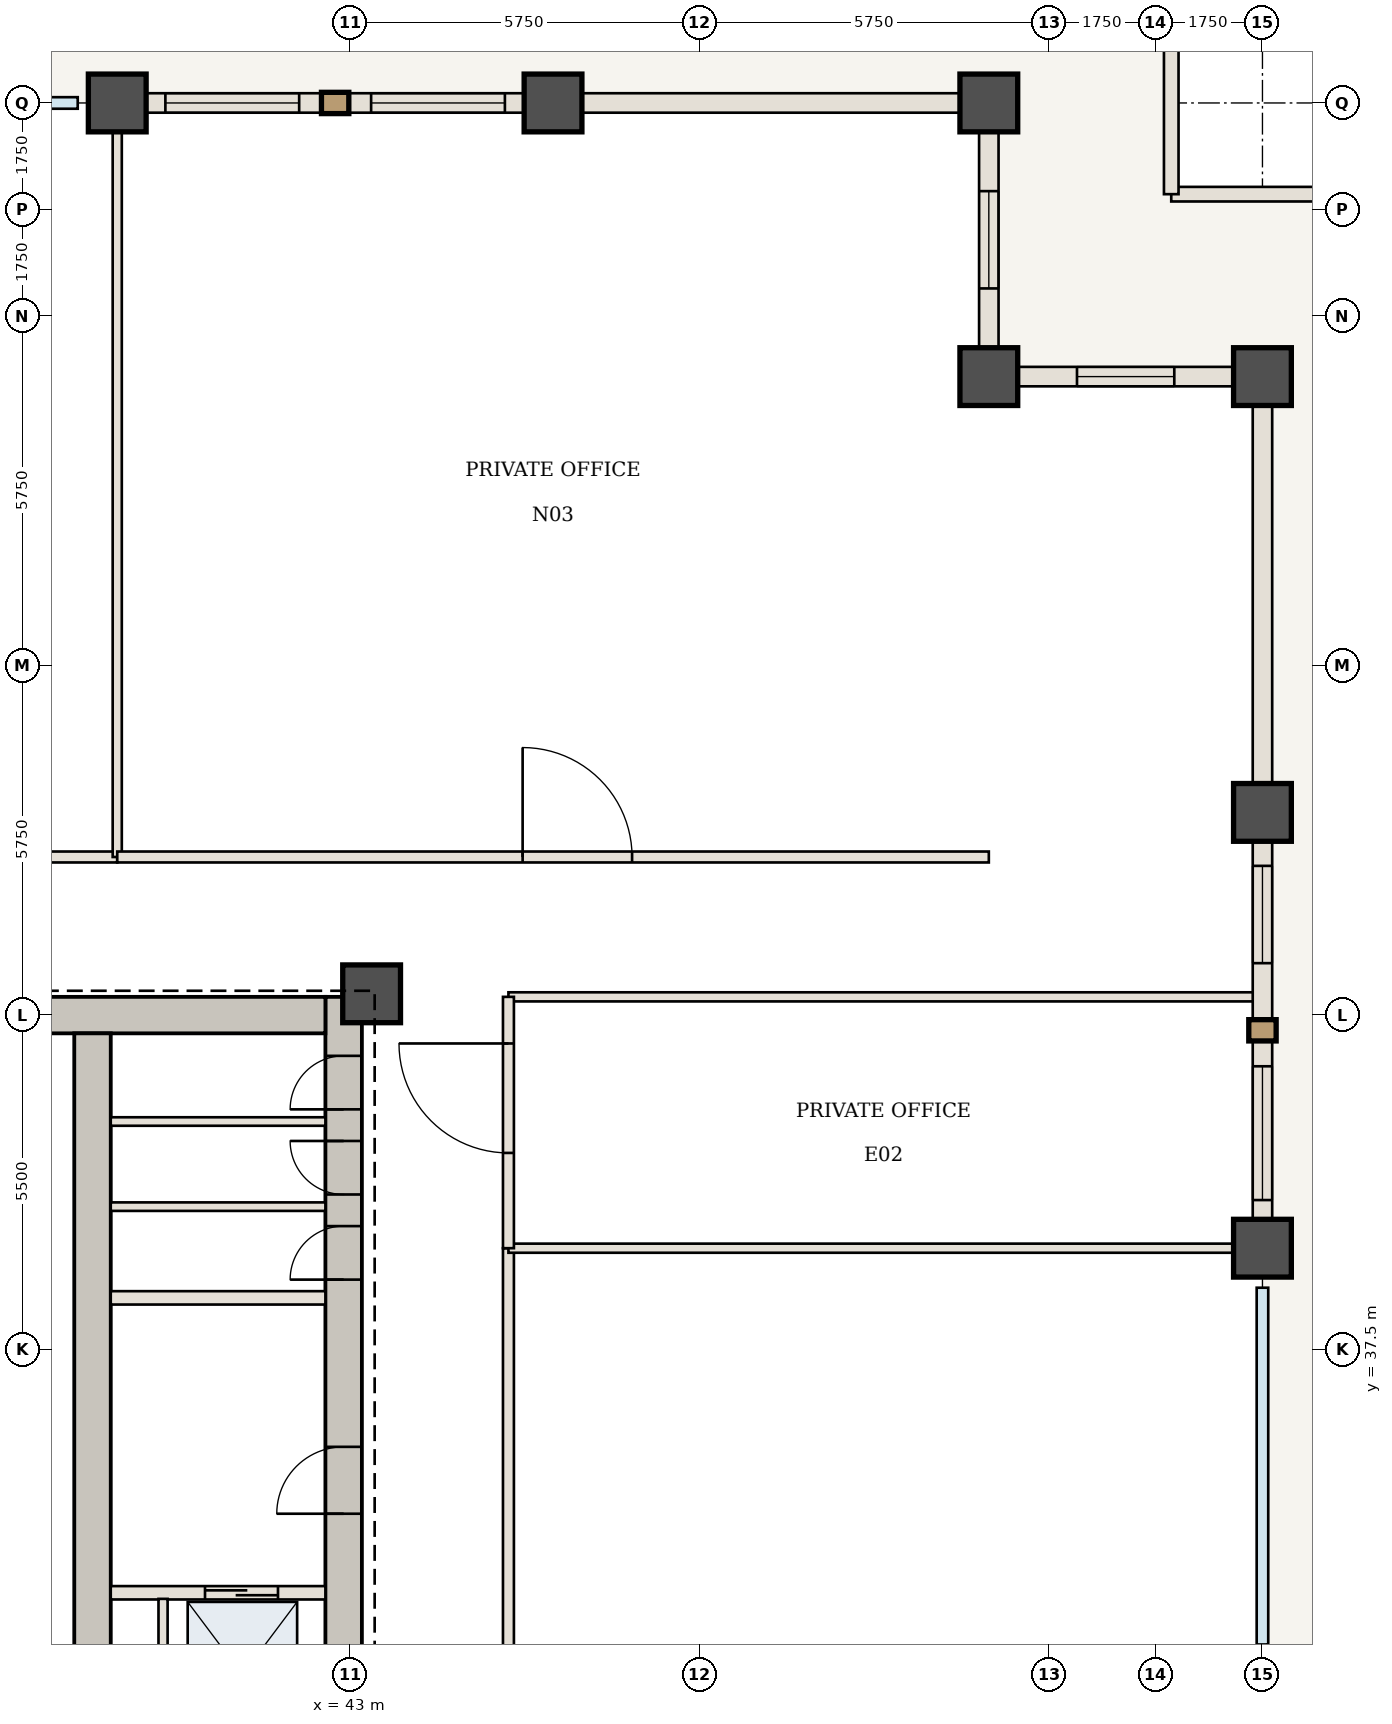
"""IFC4 building model, lengths in metres.
Left out: names, types, materials, properties, quantities, classifications, styles, units other than length and angle.
Written with IfcOpenShell. Run it as: python <this file> out.ifc"""

import sys

from ifc_helpers import new_model, si_unit, direction, frame, frame_2d, origin, origin_2d, place, context, subcontext, project, spatial, rectangle, extrude, element, fill, save


model = new_model("IFC4")
c1 = context("Model", 3, precision=1e-05, world=origin(), true_north=direction((0.0, 1.0)))
c2 = subcontext(c1, "Body", "Model", "MODEL_VIEW")
j1 = project(units=[si_unit("LENGTHUNIT", "METRE"), si_unit("PLANEANGLEUNIT", "RADIAN")], contexts=[c1])
p1 = place(None, origin())
s1 = spatial("IfcSite", under=j1, at=p1, CompositionType="ELEMENT")
p2 = place(p1, origin())
s2 = spatial("IfcBuilding", under=s1, at=p2, CompositionType="ELEMENT")
p3 = place(p2, frame((0.0, 0.0, 106.05)))
s3 = spatial("IfcBuildingStorey", under=s2, at=p3, CompositionType="ELEMENT", Elevation=106.05)
p4 = place(p3, frame((42.89, 30.6, 0.0), z_axis=(0.0, 0.0, 1.0), x_axis=(0.0, 1.0, 0.0)))
e1 = element("IfcWall", 1, at=p4, inside=s3, PredefinedType="SHEAR", context=c2, shape_type="SweptSolid", body=[
    extrude(rectangle(XDim=12.7, YDim=0.6, at=frame_2d((6.35, 0.0))), origin(), (0.0, 0.0, 1.0), 4.55),
])
p5 = place(p4, frame((4.2, 0.0, 0.0)))
e2 = element("IfcOpeningElement", 2, at=p5, cuts=e1, PredefinedType="OPENING", context=c2, shape_type="SweptSolid", body=[
    extrude(rectangle(XDim=1.1, YDim=2.15, at=frame_2d((0.55, 1.075))), frame((0.0, 0.31, 0.0), z_axis=(0.0, -1.0, 0.0), x_axis=(1.0, 0.0, 0.0)), (0.0, 0.0, 1.0), 0.62),
])
p6 = place(p4, frame((8.05, 0.0, 0.0)))
e3 = element("IfcOpeningElement", 3, at=p6, cuts=e1, PredefinedType="OPENING", context=c2, shape_type="SweptSolid", body=[
    extrude(rectangle(XDim=0.88, YDim=2.1, at=frame_2d((0.44, 1.05))), frame((0.0, 0.31, 0.0), z_axis=(0.0, -1.0, 0.0), x_axis=(1.0, 0.0, 0.0)), (0.0, 0.0, 1.0), 0.62),
])
p7 = place(p4, frame((9.45, 0.0, 0.0)))
e4 = element("IfcOpeningElement", 4, at=p7, cuts=e1, PredefinedType="OPENING", context=c2, shape_type="SweptSolid", body=[
    extrude(rectangle(XDim=0.88, YDim=2.1, at=frame_2d((0.44, 1.05))), frame((0.0, 0.31, 0.0), z_axis=(0.0, -1.0, 0.0), x_axis=(1.0, 0.0, 0.0)), (0.0, 0.0, 1.0), 0.62),
])
p8 = place(p4, frame((10.85, 0.0, 0.0)))
e5 = element("IfcOpeningElement", 5, at=p8, cuts=e1, PredefinedType="OPENING", context=c2, shape_type="SweptSolid", body=[
    extrude(rectangle(XDim=0.88, YDim=2.1, at=frame_2d((0.44, 1.05))), frame((0.0, 0.31, 0.0), z_axis=(0.0, -1.0, 0.0), x_axis=(1.0, 0.0, 0.0)), (0.0, 0.0, 1.0), 0.62),
])
p9 = place(p3, frame((37.75, 43.0, 0.0), z_axis=(0.0, 0.0, 1.0), x_axis=(1.0, 0.0, 0.0)))
e6 = element("IfcWall", 6, at=p9, inside=s3, PredefinedType="SHEAR", context=c2, shape_type="SweptSolid", body=[
    extrude(rectangle(XDim=4.84, YDim=0.6, at=frame_2d((2.42, 0.0))), origin(), (0.0, 0.0, 1.0), 4.55),
])
p10 = place(p3, frame((38.76, 30.6, 0.0), z_axis=(0.0, 0.0, 1.0), x_axis=(0.0, 1.0, 0.0)))
e7 = element("IfcWall", 7, at=p10, inside=s3, PredefinedType="SHEAR", context=c2, shape_type="SweptSolid", body=[
    extrude(rectangle(XDim=12.1, YDim=0.6, at=frame_2d((6.05, 0.0))), origin(), (0.0, 0.0, 1.0), 4.55),
])
p11 = place(p3, frame((43.35, 43.35, 0.0), z_axis=(0.0, 0.0, 1.0), x_axis=(1.0, 0.0, 0.0)))
e8 = element("IfcColumn", 8, at=p11, inside=s3, PredefinedType="COLUMN", context=c2, shape_type="SweptSolid", body=[
    extrude(rectangle(XDim=0.95, YDim=0.95, at=origin_2d()), origin(), (0.0, 0.0, 1.0), 4.55),
])
for number, where, z_axis, x_axis in (
    (9, (58.0, 53.5, -0.42), (0.0, 0.0, 1.0), (1.0, 0.0, 0.0)),
    (10, (53.5, 53.5, -0.42), (0.0, 0.0, 1.0), (1.0, 0.0, 0.0)),
    (11, (53.5, 58.0, -0.42), (0.0, 0.0, 1.0), (1.0, 0.0, 0.0)),
    (12, (39.167, 58.0, -0.42), (0.0, 0.0, 1.0), (1.0, 0.0, 0.0)),
    (13, (58.0, 39.167, -0.42), (0.0, 0.0, 1.0), (1.0, 0.0, 0.0)),
    (14, (46.333, 58.0, -0.42), (0.0, 0.0, 1.0), (1.0, 0.0, 0.0)),
    (15, (58.0, 46.333, -0.42), (0.0, 0.0, 1.0), (1.0, 0.0, 0.0)),
):
    element("IfcColumn", number, at=place(p3, frame(where, z_axis=z_axis, x_axis=x_axis)), inside=s3, PredefinedType="COLUMN", context=c2, shape_type="SweptSolid", body=[
        extrude(rectangle(XDim=0.95, YDim=0.95, at=origin_2d()), origin(), (0.0, 0.0, 1.0), 4.97),
    ])
p12 = place(p3, frame((39.06, 33.5, 0.0), z_axis=(0.0, 0.0, 1.0), x_axis=(1.0, 0.0, 0.0)))
e16 = element("IfcWall", 16, at=p12, inside=s3, PredefinedType="STANDARD", context=c2, shape_type="SweptSolid", body=[
    extrude(rectangle(XDim=3.53, YDim=0.22, at=frame_2d((1.765, 0.0))), origin(), (0.0, 0.0, 1.0), 4.13),
])
p13 = place(p12, frame((1.55, 0.0, 0.0)))
e17 = element("IfcOpeningElement", 17, at=p13, cuts=e16, PredefinedType="OPENING", context=c2, shape_type="SweptSolid", body=[
    extrude(rectangle(XDim=1.2, YDim=2.2, at=frame_2d((0.6, 1.1))), frame((0.0, 0.12, 0.0), z_axis=(0.0, -1.0, 0.0), x_axis=(1.0, 0.0, 0.0)), (0.0, 0.0, 1.0), 0.24),
])
p14 = place(p3, frame((39.92, 30.75, 0.0), z_axis=(0.0, 0.0, 1.0), x_axis=(0.0, 1.0, 0.0)))
e18 = element("IfcWall", 18, at=p14, inside=s3, PredefinedType="STANDARD", context=c2, shape_type="SweptSolid", body=[
    extrude(rectangle(XDim=2.65, YDim=0.15, at=frame_2d((1.325, 0.0))), origin(), (0.0, 0.0, 1.0), 4.13),
])
p15 = place(p3, frame((39.06, 38.35, 0.0), z_axis=(0.0, 0.0, 1.0), x_axis=(1.0, 0.0, 0.0)))
e19 = element("IfcWall", 19, at=p15, inside=s3, PredefinedType="STANDARD", context=c2, shape_type="SweptSolid", body=[
    extrude(rectangle(XDim=3.53, YDim=0.22, at=frame_2d((1.765, 0.0))), origin(), (0.0, 0.0, 1.0), 4.13),
])
for number, where, z_axis, x_axis in (
    (20, (39.06, 39.85, 0.0), (0.0, 0.0, 1.0), (1.0, 0.0, 0.0)),
    (21, (39.06, 41.25, 0.0), (0.0, 0.0, 1.0), (1.0, 0.0, 0.0)),
):
    element("IfcWall", number, at=place(p3, frame(where, z_axis=z_axis, x_axis=x_axis)), inside=s3, PredefinedType="STANDARD", context=c2, shape_type="SweptSolid", body=[
        extrude(rectangle(XDim=3.53, YDim=0.14, at=frame_2d((1.765, 0.0))), origin(), (0.0, 0.0, 1.0), 4.13),
    ])
p16 = place(p3, frame((24.833, 45.6, 0.0), z_axis=(0.0, 0.0, 1.0), x_axis=(1.0, 0.0, 0.0)))
e22 = element("IfcWall", 22, at=p16, inside=s3, PredefinedType="STANDARD", context=c2, shape_type="SweptSolid", body=[
    extrude(rectangle(XDim=14.333, YDim=0.18, at=frame_2d((7.167, 0.0))), origin(), (0.0, 0.0, 1.0), 4.13),
])
p17 = place(p16, frame((8.117, 0.0, 0.0)))
e23 = element("IfcOpeningElement", 23, at=p17, cuts=e22, PredefinedType="OPENING", context=c2, shape_type="SweptSolid", body=[
    extrude(rectangle(XDim=1.8, YDim=2.35, at=frame_2d((0.9, 1.175))), frame((0.0, 0.1, 0.0), z_axis=(0.0, -1.0, 0.0), x_axis=(1.0, 0.0, 0.0)), (0.0, 0.0, 1.0), 0.2),
])
p18 = place(p3, frame((39.167, 45.6, 0.0), z_axis=(0.0, 0.0, 1.0), x_axis=(0.0, 1.0, 0.0)))
e24 = element("IfcWall", 24, at=p18, inside=s3, PredefinedType="STANDARD", context=c2, shape_type="SweptSolid", body=[
    extrude(rectangle(XDim=12.34, YDim=0.15, at=frame_2d((6.17, 0.0))), origin(), (0.0, 0.0, 1.0), 4.13),
])
p19 = place(p3, frame((39.167, 45.6, 0.0), z_axis=(0.0, 0.0, 1.0), x_axis=(1.0, 0.0, 0.0)))
e25 = element("IfcWall", 25, at=p19, inside=s3, PredefinedType="STANDARD", context=c2, shape_type="SweptSolid", body=[
    extrude(rectangle(XDim=14.333, YDim=0.18, at=frame_2d((7.167, 0.0))), origin(), (0.0, 0.0, 1.0), 4.13),
])
p20 = place(p19, frame((6.667, 0.0, 0.0)))
e26 = element("IfcOpeningElement", 26, at=p20, cuts=e25, PredefinedType="OPENING", context=c2, shape_type="SweptSolid", body=[
    extrude(rectangle(XDim=1.8, YDim=2.35, at=frame_2d((0.9, 1.175))), frame((0.0, 0.1, 0.0), z_axis=(0.0, -1.0, 0.0), x_axis=(1.0, 0.0, 0.0)), (0.0, 0.0, 1.0), 0.2),
])
p21 = place(p3, frame((45.6, 43.3, 0.0), z_axis=(0.0, 0.0, 1.0), x_axis=(1.0, 0.0, 0.0)))
e27 = element("IfcWall", 27, at=p21, inside=s3, PredefinedType="STANDARD", context=c2, shape_type="SweptSolid", body=[
    extrude(rectangle(XDim=12.34, YDim=0.15, at=frame_2d((6.17, 0.0))), origin(), (0.0, 0.0, 1.0), 3.501),
])
p22 = place(p3, frame((45.6, 20.7, 0.0), z_axis=(0.0, 0.0, 1.0), x_axis=(0.0, 1.0, 0.0)))
e28 = element("IfcWall", 28, at=p22, inside=s3, PredefinedType="STANDARD", context=c2, shape_type="SweptSolid", body=[
    extrude(rectangle(XDim=18.467, YDim=0.18, at=frame_2d((9.233, 0.0))), origin(), (0.0, 0.0, 1.0), 4.13),
])
p23 = place(p22, frame((8.733, 0.0, 0.0)))
e29 = element("IfcOpeningElement", 29, at=p23, cuts=e28, PredefinedType="OPENING", context=c2, shape_type="SweptSolid", body=[
    extrude(rectangle(XDim=1.8, YDim=2.35, at=frame_2d((0.9, 1.175))), frame((0.0, 0.1, 0.0), z_axis=(0.0, -1.0, 0.0), x_axis=(1.0, 0.0, 0.0)), (0.0, 0.0, 1.0), 0.2),
])
p24 = place(p3, frame((45.6, 39.167, 0.0), z_axis=(0.0, 0.0, 1.0), x_axis=(1.0, 0.0, 0.0)))
e30 = element("IfcWall", 30, at=p24, inside=s3, PredefinedType="STANDARD", context=c2, shape_type="SweptSolid", body=[
    extrude(rectangle(XDim=12.34, YDim=0.15, at=frame_2d((6.17, 0.0))), origin(), (0.0, 0.0, 1.0), 4.13),
])
p25 = place(p3, frame((45.6, 39.167, 0.0), z_axis=(0.0, 0.0, 1.0), x_axis=(0.0, 1.0, 0.0)))
e31 = element("IfcWall", 31, at=p25, inside=s3, PredefinedType="STANDARD", context=c2, shape_type="SweptSolid", body=[
    extrude(rectangle(XDim=4.133, YDim=0.18, at=frame_2d((2.067, 0.0))), origin(), (0.0, 0.0, 1.0), 4.13),
])
p26 = place(p25, frame((1.567, 0.0, 0.0)))
e32 = element("IfcOpeningElement", 32, at=p26, cuts=e31, PredefinedType="OPENING", context=c2, shape_type="SweptSolid", body=[
    extrude(rectangle(XDim=1.8, YDim=2.35, at=frame_2d((0.9, 1.175))), frame((0.0, 0.1, 0.0), z_axis=(0.0, -1.0, 0.0), x_axis=(1.0, 0.0, 0.0)), (0.0, 0.0, 1.0), 0.2),
])
for number, where, z_axis, x_axis in (
    (33, (60.0, 56.5, 0.0), (0.0, 0.0, 1.0), (-1.0, 0.0, 0.0)),
    (34, (56.5, 56.5, 0.0), (0.0, 0.0, 1.0), (0.0, 1.0, 0.0)),
):
    element("IfcWall", number, at=place(p3, frame(where, z_axis=z_axis, x_axis=x_axis)), inside=s3, PredefinedType="PARAPET", context=c2, shape_type="SweptSolid", body=[
        extrude(rectangle(XDim=3.5, YDim=0.24, at=frame_2d((1.75, 0.0))), origin(), (0.0, 0.0, 1.0), 0.65),
    ])
p27 = place(p3, frame((39.167, 58.0, 0.0), z_axis=(0.0, 0.0, 1.0), x_axis=(1.0, 0.0, 0.0)))
e35 = element("IfcWall", 35, at=p27, inside=s3, PredefinedType="USERDEFINED", context=c2, shape_type="SweptSolid", body=[
    extrude(rectangle(XDim=7.167, YDim=0.32, at=frame_2d((3.583, 0.0))), origin(), (0.0, 0.0, 1.0), 3.33),
])
p28 = place(p27, frame((0.792, 0.0, 0.85)))
e36 = element("IfcOpeningElement", 36, at=p28, cuts=e35, PredefinedType="OPENING", context=c2, shape_type="SweptSolid", body=[
    extrude(rectangle(XDim=2.2, YDim=2.2, at=frame_2d((1.1, 1.1))), frame((0.0, 0.17, 0.0), z_axis=(0.0, -1.0, 0.0), x_axis=(1.0, 0.0, 0.0)), (0.0, 0.0, 1.0), 0.34),
])
p29 = place(p27, frame((4.175, 0.0, 0.85)))
e37 = element("IfcOpeningElement", 37, at=p29, cuts=e35, PredefinedType="OPENING", context=c2, shape_type="SweptSolid", body=[
    extrude(rectangle(XDim=2.2, YDim=2.2, at=frame_2d((1.1, 1.1))), frame((0.0, 0.17, 0.0), z_axis=(0.0, -1.0, 0.0), x_axis=(1.0, 0.0, 0.0)), (0.0, 0.0, 1.0), 0.34),
])
p30 = place(p3, frame((46.333, 58.0, 0.0), z_axis=(0.0, 0.0, 1.0), x_axis=(1.0, 0.0, 0.0)))
e38 = element("IfcWall", 38, at=p30, inside=s3, PredefinedType="USERDEFINED", context=c2, shape_type="SweptSolid", body=[
    extrude(rectangle(XDim=7.167, YDim=0.32, at=frame_2d((3.583, 0.0))), origin(), (0.0, 0.0, 1.0), 3.33),
])
p31 = place(p3, frame((58.0, 46.333, 0.0), z_axis=(0.0, 0.0, 1.0), x_axis=(0.0, -1.0, 0.0)))
e39 = element("IfcWall", 39, at=p31, inside=s3, PredefinedType="USERDEFINED", context=c2, shape_type="SweptSolid", body=[
    extrude(rectangle(XDim=7.167, YDim=0.32, at=frame_2d((3.583, 0.0))), origin(), (0.0, 0.0, 1.0), 3.33),
])
p32 = place(p31, frame((0.879, 0.0, 0.85)))
e40 = element("IfcOpeningElement", 40, at=p32, cuts=e39, PredefinedType="OPENING", context=c2, shape_type="SweptSolid", body=[
    extrude(rectangle(XDim=1.6, YDim=2.15, at=frame_2d((0.8, 1.075))), frame((0.0, 0.17, 0.0), z_axis=(0.0, -1.0, 0.0), x_axis=(1.0, 0.0, 0.0)), (0.0, 0.0, 1.0), 0.34),
])
p33 = place(p31, frame((4.175, 0.0, 0.85)))
e41 = element("IfcOpeningElement", 41, at=p33, cuts=e39, PredefinedType="OPENING", context=c2, shape_type="SweptSolid", body=[
    extrude(rectangle(XDim=2.2, YDim=2.2, at=frame_2d((1.1, 1.1))), frame((0.0, 0.17, 0.0), z_axis=(0.0, -1.0, 0.0), x_axis=(1.0, 0.0, 0.0)), (0.0, 0.0, 1.0), 0.34),
])
p34 = place(p3, frame((58.0, 53.5, 0.0), z_axis=(0.0, 0.0, 1.0), x_axis=(0.0, -1.0, 0.0)))
e42 = element("IfcWall", 42, at=p34, inside=s3, PredefinedType="USERDEFINED", context=c2, shape_type="SweptSolid", body=[
    extrude(rectangle(XDim=7.167, YDim=0.32, at=frame_2d((3.583, 0.0))), origin(), (0.0, 0.0, 1.0), 3.33),
])
p35 = place(p3, frame((53.5, 53.5, 0.0), z_axis=(0.0, 0.0, 1.0), x_axis=(1.0, 0.0, 0.0)))
e43 = element("IfcWall", 43, at=p35, inside=s3, PredefinedType="USERDEFINED", context=c2, shape_type="SweptSolid", body=[
    extrude(rectangle(XDim=4.5, YDim=0.32, at=frame_2d((2.25, 0.0))), origin(), (0.0, 0.0, 1.0), 3.33),
])
p36 = place(p35, frame((1.45, 0.0, 0.85)))
e44 = element("IfcOpeningElement", 44, at=p36, cuts=e43, PredefinedType="OPENING", context=c2, shape_type="SweptSolid", body=[
    extrude(rectangle(XDim=1.6, YDim=2.05, at=frame_2d((0.8, 1.025))), frame((0.0, 0.17, 0.0), z_axis=(0.0, -1.0, 0.0), x_axis=(1.0, 0.0, 0.0)), (0.0, 0.0, 1.0), 0.34),
])
p37 = place(p3, frame((53.5, 58.0, 0.0), z_axis=(0.0, 0.0, 1.0), x_axis=(0.0, -1.0, 0.0)))
e45 = element("IfcWall", 45, at=p37, inside=s3, PredefinedType="USERDEFINED", context=c2, shape_type="SweptSolid", body=[
    extrude(rectangle(XDim=4.5, YDim=0.32, at=frame_2d((2.25, 0.0))), origin(), (0.0, 0.0, 1.0), 3.33),
])
p38 = place(p37, frame((1.45, 0.0, 0.85)))
e46 = element("IfcOpeningElement", 46, at=p38, cuts=e45, PredefinedType="OPENING", context=c2, shape_type="SweptSolid", body=[
    extrude(rectangle(XDim=1.6, YDim=2.05, at=frame_2d((0.8, 1.025))), frame((0.0, 0.17, 0.0), z_axis=(0.0, -1.0, 0.0), x_axis=(1.0, 0.0, 0.0)), (0.0, 0.0, 1.0), 0.34),
])
p39 = place(p5, origin())
e47 = element("IfcDoor", 47, at=p39, inside=s3, OperationType="SINGLE_SWING_LEFT", PredefinedType="DOOR", context=c2, shape_type="SweptSolid", body=[
    extrude(rectangle(XDim=1.1, YDim=2.15, at=frame_2d((0.55, 1.075))), frame((0.0, 0.025, 0.0), z_axis=(0.0, -1.0, 0.0), x_axis=(1.0, 0.0, 0.0)), (0.0, 0.0, 1.0), 0.05),
])
fill(e2, e47)
p40 = place(p6, origin())
e48 = element("IfcDoor", 48, at=p40, inside=s3, OperationType="SINGLE_SWING_LEFT", PredefinedType="DOOR", context=c2, shape_type="SweptSolid", body=[
    extrude(rectangle(XDim=0.88, YDim=2.1, at=frame_2d((0.44, 1.05))), frame((0.0, 0.025, 0.0), z_axis=(0.0, -1.0, 0.0), x_axis=(1.0, 0.0, 0.0)), (0.0, 0.0, 1.0), 0.05),
])
fill(e3, e48)
p41 = place(p7, origin())
e49 = element("IfcDoor", 49, at=p41, inside=s3, OperationType="SINGLE_SWING_RIGHT", PredefinedType="DOOR", context=c2, shape_type="SweptSolid", body=[
    extrude(rectangle(XDim=0.88, YDim=2.1, at=frame_2d((0.44, 1.05))), frame((0.0, 0.025, 0.0), z_axis=(0.0, -1.0, 0.0), x_axis=(1.0, 0.0, 0.0)), (0.0, 0.0, 1.0), 0.05),
])
fill(e4, e49)
p42 = place(p8, origin())
e50 = element("IfcDoor", 50, at=p42, inside=s3, OperationType="SINGLE_SWING_LEFT", PredefinedType="DOOR", context=c2, shape_type="SweptSolid", body=[
    extrude(rectangle(XDim=0.88, YDim=2.1, at=frame_2d((0.44, 1.05))), frame((0.0, 0.025, 0.0), z_axis=(0.0, -1.0, 0.0), x_axis=(1.0, 0.0, 0.0)), (0.0, 0.0, 1.0), 0.05),
])
fill(e5, e50)
p43 = place(p13, origin())
e51 = element("IfcDoor", 51, at=p43, inside=s3, OperationType="DOUBLE_DOOR_SLIDING", PredefinedType="DOOR", context=c2, shape_type="SweptSolid", body=[
    extrude(rectangle(XDim=1.2, YDim=2.2, at=frame_2d((0.6, 1.1))), frame((0.0, 0.025, 0.0), z_axis=(0.0, -1.0, 0.0), x_axis=(1.0, 0.0, 0.0)), (0.0, 0.0, 1.0), 0.05),
])
fill(e17, e51)
p44 = place(p20, origin())
e52 = element("IfcDoor", 52, at=p44, inside=s3, OperationType="SINGLE_SWING_LEFT", PredefinedType="DOOR", context=c2, shape_type="SweptSolid", body=[
    extrude(rectangle(XDim=1.8, YDim=2.35, at=frame_2d((0.9, 1.175))), frame((0.0, 0.025, 0.0), z_axis=(0.0, -1.0, 0.0), x_axis=(1.0, 0.0, 0.0)), (0.0, 0.0, 1.0), 0.05),
])
fill(e26, e52)
p45 = place(p26, origin())
e53 = element("IfcDoor", 53, at=p45, inside=s3, OperationType="SINGLE_SWING_RIGHT", PredefinedType="DOOR", context=c2, shape_type="SweptSolid", body=[
    extrude(rectangle(XDim=1.8, YDim=2.35, at=frame_2d((0.9, 1.175))), frame((0.0, 0.025, 0.0), z_axis=(0.0, -1.0, 0.0), x_axis=(1.0, 0.0, 0.0)), (0.0, 0.0, 1.0), 0.05),
])
fill(e32, e53)
p46 = place(p28, origin())
e54 = element("IfcWindow", 54, at=p46, inside=s3, PartitioningType="SINGLE_PANEL", PredefinedType="WINDOW", context=c2, shape_type="SweptSolid", body=[
    extrude(rectangle(XDim=2.2, YDim=2.2, at=frame_2d((1.1, 1.1))), frame((0.0, 0.03, 0.0), z_axis=(0.0, -1.0, 0.0), x_axis=(1.0, 0.0, 0.0)), (0.0, 0.0, 1.0), 0.06),
])
fill(e36, e54)
p47 = place(p29, origin())
e55 = element("IfcWindow", 55, at=p47, inside=s3, PartitioningType="SINGLE_PANEL", PredefinedType="WINDOW", context=c2, shape_type="SweptSolid", body=[
    extrude(rectangle(XDim=2.2, YDim=2.2, at=frame_2d((1.1, 1.1))), frame((0.0, 0.03, 0.0), z_axis=(0.0, -1.0, 0.0), x_axis=(1.0, 0.0, 0.0)), (0.0, 0.0, 1.0), 0.06),
])
fill(e37, e55)
p48 = place(p32, origin())
e56 = element("IfcWindow", 56, at=p48, inside=s3, PartitioningType="SINGLE_PANEL", PredefinedType="WINDOW", context=c2, shape_type="SweptSolid", body=[
    extrude(rectangle(XDim=1.6, YDim=2.15, at=frame_2d((0.8, 1.075))), frame((0.0, 0.03, 0.0), z_axis=(0.0, -1.0, 0.0), x_axis=(1.0, 0.0, 0.0)), (0.0, 0.0, 1.0), 0.06),
])
fill(e40, e56)
p49 = place(p33, origin())
e57 = element("IfcWindow", 57, at=p49, inside=s3, PartitioningType="SINGLE_PANEL", PredefinedType="WINDOW", context=c2, shape_type="SweptSolid", body=[
    extrude(rectangle(XDim=2.2, YDim=2.2, at=frame_2d((1.1, 1.1))), frame((0.0, 0.03, 0.0), z_axis=(0.0, -1.0, 0.0), x_axis=(1.0, 0.0, 0.0)), (0.0, 0.0, 1.0), 0.06),
])
fill(e41, e57)
p50 = place(p36, origin())
e58 = element("IfcWindow", 58, at=p50, inside=s3, PartitioningType="SINGLE_PANEL", PredefinedType="WINDOW", context=c2, shape_type="SweptSolid", body=[
    extrude(rectangle(XDim=1.6, YDim=2.05, at=frame_2d((0.8, 1.025))), frame((0.0, 0.03, 0.0), z_axis=(0.0, -1.0, 0.0), x_axis=(1.0, 0.0, 0.0)), (0.0, 0.0, 1.0), 0.06),
])
fill(e44, e58)
p51 = place(p38, origin())
e59 = element("IfcWindow", 59, at=p51, inside=s3, PartitioningType="SINGLE_PANEL", PredefinedType="WINDOW", context=c2, shape_type="SweptSolid", body=[
    extrude(rectangle(XDim=1.6, YDim=2.05, at=frame_2d((0.8, 1.025))), frame((0.0, 0.03, 0.0), z_axis=(0.0, -1.0, 0.0), x_axis=(1.0, 0.0, 0.0)), (0.0, 0.0, 1.0), 0.06),
])
fill(e46, e59)
save(model, sys.argv[1])
